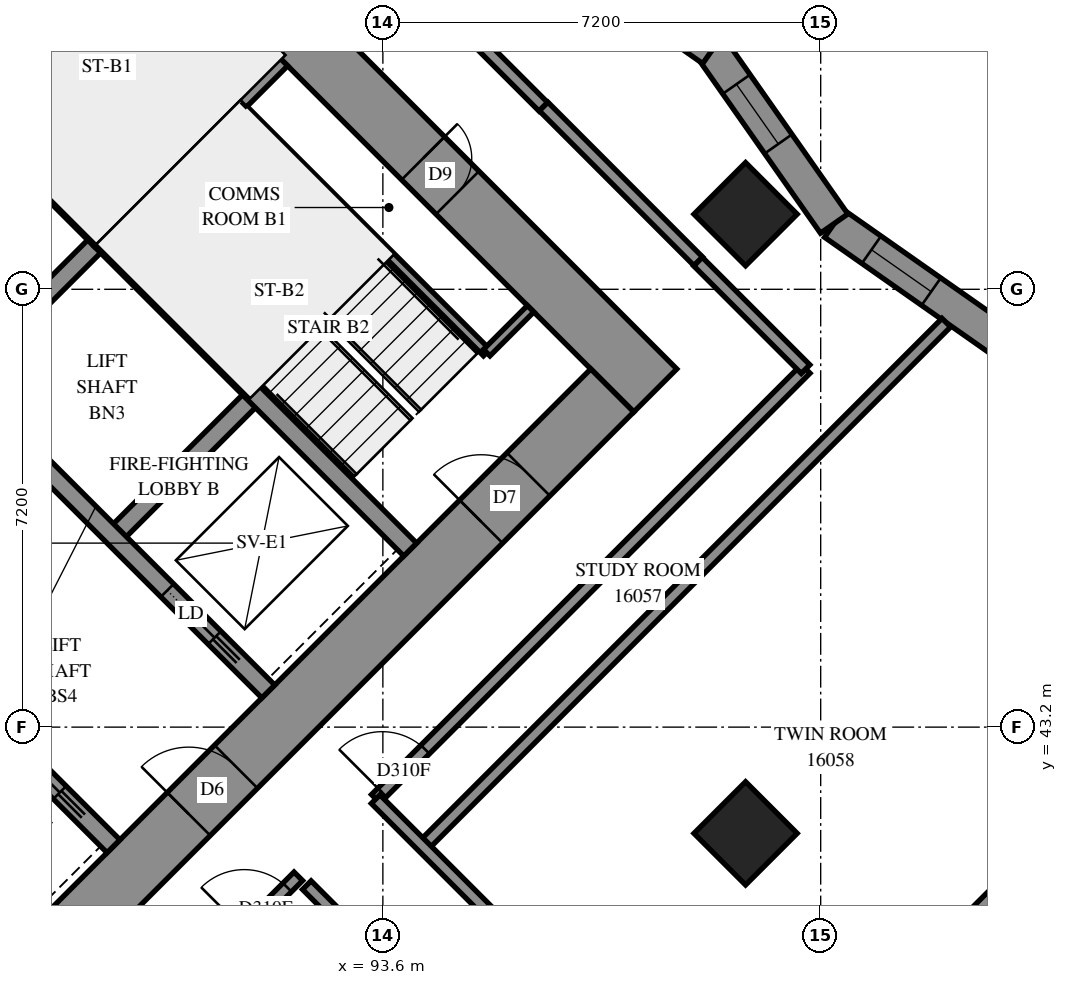
"""IFC4 building model, lengths in metres.
Left out: names, types, materials, properties, quantities, classifications, styles, units other than length and angle.
Written with IfcOpenShell. Run it as: python <this file> out.ifc"""

import sys

from ifc_helpers import new_model, si_unit, direction, frame, frame_2d, origin, origin_2d, place, context, subcontext, project, spatial, polyline, rectangle, outline, extrude, element, fill, save


model = new_model("IFC4")
c1 = context("Model", 3, precision=1e-05, world=origin(), true_north=direction((0.0, 1.0)))
c2 = subcontext(c1, "Body", "Model", "MODEL_VIEW")
j1 = project(units=[si_unit("LENGTHUNIT", "METRE"), si_unit("PLANEANGLEUNIT", "RADIAN")], contexts=[c1])
p1 = place(None, origin())
s1 = spatial("IfcSite", under=j1, at=p1, CompositionType="ELEMENT")
p2 = place(p1, origin())
s2 = spatial("IfcBuilding", under=s1, at=p2, CompositionType="ELEMENT")
p3 = place(p2, frame((0.0, 0.0, 61.0)))
s3 = spatial("IfcBuildingStorey", under=s2, at=p3, CompositionType="ELEMENT", Elevation=61.0)
for number, where, z_axis, x_axis in (
    (1, (99.565, 51.635, 0.0), (0.0, 0.0, 1.0), (0.707, -0.707, 0.0)),
    (2, (99.565, 41.453, 0.0), (0.0, 0.0, 1.0), (0.707, -0.707, 0.0)),
):
    element("IfcColumn", number, at=place(p3, frame(where, z_axis=z_axis, x_axis=x_axis)), inside=s3, PredefinedType="COLUMN", context=c2, shape_type="SweptSolid", body=[
        extrude(rectangle(XDim=1.2, YDim=1.2, at=origin_2d()), origin(), (0.0, 0.0, 1.0), 3.1),
    ])
p4 = place(p3, frame((86.483, 60.333, -0.3), z_axis=(0.0, 0.0, 1.0), x_axis=(0.70710983, -0.7071037324, 0.0)))
e3 = element("IfcWall", 3, at=p4, inside=s3, PredefinedType="SHEAR", context=c2, shape_type="SweptSolid", body=[
    extrude(rectangle(XDim=16.4, YDim=1.0, at=frame_2d((8.2, 0.0))), origin(), (0.0, 0.0, 1.0), 2.7),
])
p5 = place(p4, frame((11.0, 0.0, 0.3)))
e4 = element("IfcOpeningElement", 4, at=p5, cuts=e3, PredefinedType="OPENING", context=c2, shape_type="SweptSolid", body=[
    extrude(rectangle(XDim=0.8, YDim=2.1, at=frame_2d((0.4, 1.05))), frame((0.0, 0.51, 0.0), z_axis=(0.0, -1.0, 0.0), x_axis=(1.0, 0.0, 0.0)), (0.0, 0.0, 1.0), 1.02),
])
p6 = place(p3, frame((87.19, 38.554, -0.3), z_axis=(0.0, 0.0, 1.0), x_axis=(0.707103309, 0.7071102534, 0.0)))
e5 = element("IfcWall", 5, at=p6, inside=s3, PredefinedType="SHEAR", context=c2, shape_type="SweptSolid", body=[
    extrude(rectangle(XDim=14.4, YDim=1.0, at=frame_2d((7.2, 0.0))), origin(), (0.0, 0.0, 1.0), 2.7),
])
p7 = place(p6, frame((4.55, 0.0, 0.3)))
e6 = element("IfcOpeningElement", 6, at=p7, cuts=e5, PredefinedType="OPENING", context=c2, shape_type="SweptSolid", body=[
    extrude(rectangle(XDim=1.1, YDim=2.1, at=frame_2d((0.55, 1.05))), frame((0.0, 0.51, 0.0), z_axis=(0.0, -1.0, 0.0), x_axis=(1.0, 0.0, 0.0)), (0.0, 0.0, 1.0), 1.02),
])
p8 = place(p6, frame((11.35, 0.0, 0.3)))
e7 = element("IfcOpeningElement", 7, at=p8, cuts=e5, PredefinedType="OPENING", context=c2, shape_type="SweptSolid", body=[
    extrude(rectangle(XDim=1.1, YDim=2.1, at=frame_2d((0.55, 1.05))), frame((0.0, 0.51, 0.0), z_axis=(0.0, -1.0, 0.0), x_axis=(1.0, 0.0, 0.0)), (0.0, 0.0, 1.0), 1.02),
])
for number, where, z_axis, x_axis in (
    (8, (86.625, 48.878, 0.0), (0.0, 0.0, 1.0), (0.707, 0.707, 0.0)),
    (9, (89.17, 46.332, 0.0), (0.0, 0.0, 1.0), (0.707, 0.707, 0.0)),
):
    element("IfcWall", number, at=place(p3, frame(where, z_axis=z_axis, x_axis=x_axis)), inside=s3, PredefinedType="SOLIDWALL", context=c2, shape_type="SweptSolid", body=[
        extrude(rectangle(XDim=3.3, YDim=0.3, at=frame_2d((1.65, 0.0))), origin(), (0.0, 0.0, 1.0), 3.1),
    ])
p9 = place(p3, frame((78.988, 51.423, 0.0), z_axis=(0.0, 0.0, 1.0), x_axis=(0.7071067812, -0.7071067812, 0.0)))
e10 = element("IfcWall", 10, at=p9, inside=s3, PredefinedType="SOLIDWALL", context=c2, shape_type="SweptSolid", body=[
    extrude(rectangle(XDim=14.4, YDim=0.3, at=frame_2d((7.2, 0.0))), origin(), (0.0, 0.0, 1.0), 3.1),
])
p10 = place(p9, frame((1.25, 0.0, 0.0)))
e11 = element("IfcOpeningElement", 11, at=p10, cuts=e10, PredefinedType="OPENING", context=c2, shape_type="SweptSolid", body=[
    extrude(rectangle(XDim=1.1, YDim=2.1, at=frame_2d((0.55, 1.05))), frame((0.0, 0.16, 0.0), z_axis=(0.0, -1.0, 0.0), x_axis=(1.0, 0.0, 0.0)), (0.0, 0.0, 1.0), 0.32),
])
p11 = place(p9, frame((4.85, 0.0, 0.0)))
e12 = element("IfcOpeningElement", 12, at=p11, cuts=e10, PredefinedType="OPENING", context=c2, shape_type="SweptSolid", body=[
    extrude(rectangle(XDim=1.1, YDim=2.1, at=frame_2d((0.55, 1.05))), frame((0.0, 0.16, 0.0), z_axis=(0.0, -1.0, 0.0), x_axis=(1.0, 0.0, 0.0)), (0.0, 0.0, 1.0), 0.32),
])
p12 = place(p9, frame((8.45, 0.0, 0.0)))
e13 = element("IfcOpeningElement", 13, at=p12, cuts=e10, PredefinedType="OPENING", context=c2, shape_type="SweptSolid", body=[
    extrude(rectangle(XDim=1.1, YDim=2.1, at=frame_2d((0.55, 1.05))), frame((0.0, 0.16, 0.0), z_axis=(0.0, -1.0, 0.0), x_axis=(1.0, 0.0, 0.0)), (0.0, 0.0, 1.0), 0.32),
])
p13 = place(p9, frame((12.05, 0.0, 0.0)))
e14 = element("IfcOpeningElement", 14, at=p13, cuts=e10, PredefinedType="OPENING", context=c2, shape_type="SweptSolid", body=[
    extrude(rectangle(XDim=1.1, YDim=2.1, at=frame_2d((0.55, 1.05))), frame((0.0, 0.16, 0.0), z_axis=(0.0, -1.0, 0.0), x_axis=(1.0, 0.0, 0.0)), (0.0, 0.0, 1.0), 0.32),
])
p14 = place(p3, frame((81.534, 53.969, 0.0), z_axis=(0.0, 0.0, 1.0), x_axis=(0.707103309, -0.7071102534, 0.0)))
e15 = element("IfcWall", 15, at=p14, inside=s3, PredefinedType="SOLIDWALL", context=c2, shape_type="SweptSolid", body=[
    extrude(rectangle(XDim=14.4, YDim=0.3, at=frame_2d((7.2, 0.0))), origin(), (0.0, 0.0, 1.0), 3.1),
])
p15 = place(p14, frame((12.05, 0.0, 0.0)))
e16 = element("IfcOpeningElement", 16, at=p15, cuts=e15, PredefinedType="OPENING", context=c2, shape_type="SweptSolid", body=[
    extrude(rectangle(XDim=1.1, YDim=2.1, at=frame_2d((0.55, 1.05))), frame((0.0, 0.16, 0.0), z_axis=(0.0, -1.0, 0.0), x_axis=(1.0, 0.0, 0.0)), (0.0, 0.0, 1.0), 0.32),
])
for number, where, z_axis, x_axis in (
    (17, (83.867, 56.302, 0.0), (0.0, 0.0, 1.0), (0.707, -0.707, 0.0)),
    (18, (88.958, 51.211, 0.0), (0.0, 0.0, 1.0), (0.707, -0.707, 0.0)),
):
    element("IfcWall", number, at=place(p3, frame(where, z_axis=z_axis, x_axis=x_axis)), inside=s3, PredefinedType="SOLIDWALL", context=c2, shape_type="SweptSolid", body=[
        extrude(rectangle(XDim=7.2, YDim=0.3, at=frame_2d((3.6, 0.0))), origin(), (0.0, 0.0, 1.0), 3.1),
    ])
p16 = place(p3, frame((88.958, 51.211, 0.0), z_axis=(0.0, 0.0, 1.0), x_axis=(0.7071067812, 0.7071067812, 0.0)))
e19 = element("IfcWall", 19, at=p16, inside=s3, PredefinedType="SOLIDWALL", context=c2, shape_type="SweptSolid", body=[
    extrude(rectangle(XDim=4.2, YDim=0.3, at=frame_2d((2.1, 0.0))), origin(), (0.0, 0.0, 1.0), 3.1),
])
p17 = place(p3, frame((103.878, 49.477, 0.0), z_axis=(0.0, 0.0, 1.0), x_axis=(-0.8186472188, 0.5742967275, 0.0)))
e20 = element("IfcWall", 20, at=p17, inside=s3, PredefinedType="SOLIDWALL", context=c2, shape_type="SweptSolid", body=[
    extrude(outline(polyline([(-0.048, -0.275), (3.442, -0.275), (3.538, 0.275), (0.048, 0.275), (-0.048, -0.275)])), origin(), (0.0, 0.0, 1.0), 3.1),
])
p18 = place(p17, frame((1.541, 0.0, 0.5)))
e21 = element("IfcOpeningElement", 21, at=p18, cuts=e20, PredefinedType="OPENING", context=c2, shape_type="SweptSolid", body=[
    extrude(rectangle(XDim=1.2, YDim=2.45, at=frame_2d((0.6, 1.225))), frame((0.0, 0.285, 0.0), z_axis=(0.0, -1.0, 0.0), x_axis=(1.0, 0.0, 0.0)), (0.0, 0.0, 1.0), 0.57),
])
p19 = place(p3, frame((101.022, 51.481, 0.0), z_axis=(0.0, 0.0, 1.0), x_axis=(-0.5742967275, 0.8186472188, 0.0)))
e22 = element("IfcWall", 22, at=p19, inside=s3, PredefinedType="SOLIDWALL", context=c2, shape_type="SweptSolid", body=[
    extrude(outline(polyline([(0.048, -0.275), (3.538, -0.275), (3.442, 0.275), (-0.048, 0.275), (0.048, -0.275)])), origin(), (0.0, 0.0, 1.0), 3.1),
])
p20 = place(p19, frame((1.599, 0.0, 0.5)))
e23 = element("IfcOpeningElement", 23, at=p20, cuts=e22, PredefinedType="OPENING", context=c2, shape_type="SweptSolid", body=[
    extrude(rectangle(XDim=1.2, YDim=2.45, at=frame_2d((0.6, 1.225))), frame((0.0, 0.285, 0.0), z_axis=(0.0, -1.0, 0.0), x_axis=(1.0, 0.0, 0.0)), (0.0, 0.0, 1.0), 0.57),
])
p21 = place(p3, frame((99.017, 54.337, 0.0), z_axis=(0.0, 0.0, 1.0), x_axis=(-0.8186566697, 0.5742832552, 0.0)))
e24 = element("IfcWall", 24, at=p21, inside=s3, PredefinedType="SOLIDWALL", context=c2, shape_type="SweptSolid", body=[
    extrude(outline(polyline([(-0.048, -0.275), (3.442, -0.275), (3.538, 0.275), (0.048, 0.275), (-0.048, -0.275)])), origin(), (0.0, 0.0, 1.0), 3.1),
])
p22 = place(p21, frame((1.706, 0.0, 0.5)))
e25 = element("IfcOpeningElement", 25, at=p22, cuts=e24, PredefinedType="OPENING", context=c2, shape_type="SweptSolid", body=[
    extrude(rectangle(XDim=1.2, YDim=2.45, at=frame_2d((0.6, 1.225))), frame((0.0, 0.285, 0.0), z_axis=(0.0, -1.0, 0.0), x_axis=(1.0, 0.0, 0.0)), (0.0, 0.0, 1.0), 0.57),
])
p23 = place(p3, frame((91.313, 53.354, 0.0), z_axis=(0.0, 0.0, 1.0), x_axis=(0.7071067812, -0.7071067812, 0.0)))
e26 = element("IfcWall", 26, at=p23, inside=s3, PredefinedType="PARTITIONING", context=c2, shape_type="SweptSolid", body=[
    extrude(rectangle(XDim=5.65, YDim=0.15, at=frame_2d((2.825, 0.0))), origin(), (0.0, 0.0, 1.0), 3.1),
])
p24 = place(p3, frame((95.308, 49.358, 0.0), z_axis=(0.0, 0.0, 1.0), x_axis=(0.70705776, 0.707155799, 0.0)))
e27 = element("IfcWall", 27, at=p24, inside=s3, PredefinedType="PARTITIONING", context=c2, shape_type="SweptSolid", body=[
    extrude(rectangle(XDim=1.02, YDim=0.15, at=frame_2d((0.51, 0.0))), origin(), (0.0, 0.0, 1.0), 3.1),
])
p25 = place(p3, frame((86.833, 62.805, 0.0), z_axis=(0.0, 0.0, 1.0), x_axis=(0.7072045138, -0.7070090351, 0.0)))
e28 = element("IfcWall", 28, at=p25, inside=s3, PredefinedType="PARTITIONING", context=c2, shape_type="SweptSolid", body=[
    extrude(rectangle(XDim=13.301, YDim=0.2, at=frame_2d((6.65, 0.0))), origin(), (0.0, 0.0, 1.0), 3.1),
])
p26 = place(p25, frame((10.586, 0.0, 0.0)))
e29 = element("IfcOpeningElement", 29, at=p26, cuts=e28, PredefinedType="OPENING", context=c2, shape_type="SweptSolid", body=[
    extrude(rectangle(XDim=1.0, YDim=2.1, at=frame_2d((0.5, 1.05))), frame((0.0, 0.11, 0.0), z_axis=(0.0, -1.0, 0.0), x_axis=(1.0, 0.0, 0.0)), (0.0, 0.0, 1.0), 0.22),
])
p27 = place(p3, frame((94.259, 41.243, 0.0), z_axis=(0.0, 0.0, 1.0), x_axis=(0.7070205168, 0.707193035, 0.0)))
e30 = element("IfcWall", 30, at=p27, inside=s3, PredefinedType="PARTITIONING", context=c2, shape_type="SweptSolid", body=[
    extrude(rectangle(XDim=12.173, YDim=0.2, at=frame_2d((6.086, 0.0))), origin(), (0.0, 0.0, 1.0), 3.1),
])
p28 = place(p3, frame((93.484, 42.02, 0.0), z_axis=(0.0, 0.0, 1.0), x_axis=(0.7071067812, 0.7071067812, 0.0)))
e31 = element("IfcWall", 31, at=p28, inside=s3, PredefinedType="PARTITIONING", context=c2, shape_type="SweptSolid", body=[
    extrude(rectangle(XDim=9.998, YDim=0.2, at=frame_2d((4.999, 0.0))), origin(), (0.0, 0.0, 1.0), 3.1),
])
p29 = place(p28, frame((0.148, 0.0, 0.0)))
e32 = element("IfcOpeningElement", 32, at=p29, cuts=e31, PredefinedType="OPENING", context=c2, shape_type="SweptSolid", body=[
    extrude(rectangle(XDim=1.0, YDim=2.1, at=frame_2d((0.5, 1.05))), frame((0.0, 0.11, 0.0), z_axis=(0.0, -1.0, 0.0), x_axis=(1.0, 0.0, 0.0)), (0.0, 0.0, 1.0), 0.22),
])
p30 = place(p3, frame((101.049, 37.847, 0.0), z_axis=(0.0, 0.0, 1.0), x_axis=(0.7071067812, 0.7071067812, 0.0)))
e33 = element("IfcWall", 33, at=p30, inside=s3, PredefinedType="PARTITIONING", context=c2, shape_type="SweptSolid", body=[
    extrude(rectangle(XDim=9.831, YDim=0.2, at=frame_2d((4.915, 0.0))), origin(), (0.0, 0.0, 1.0), 3.1),
])
p31 = place(p3, frame((92.349, 40.601, 0.0), z_axis=(0.0, 0.0, 1.0), x_axis=(0.7071067812, -0.7071067812, 0.0)))
e34 = element("IfcWall", 34, at=p31, inside=s3, PredefinedType="PARTITIONING", context=c2, shape_type="SweptSolid", body=[
    extrude(rectangle(XDim=8.101, YDim=0.2, at=frame_2d((4.05, 0.0))), origin(), (0.0, 0.0, 1.0), 3.1),
])
p32 = place(p31, frame((2.909, 0.0, 0.0)))
e35 = element("IfcOpeningElement", 35, at=p32, cuts=e34, PredefinedType="OPENING", context=c2, shape_type="SweptSolid", body=[
    extrude(rectangle(XDim=0.9, YDim=2.1, at=frame_2d((0.45, 1.05))), frame((0.0, 0.11, 0.0), z_axis=(0.0, -1.0, 0.0), x_axis=(1.0, 0.0, 0.0)), (0.0, 0.0, 1.0), 0.22),
])
p33 = place(p3, frame((86.836, 35.372, 0.0), z_axis=(0.0, 0.0, 1.0), x_axis=(0.7071067812, 0.7071067812, 0.0)))
e36 = element("IfcWall", 36, at=p33, inside=s3, PredefinedType="PARTITIONING", context=c2, shape_type="SweptSolid", body=[
    extrude(rectangle(XDim=7.6, YDim=0.2, at=frame_2d((3.8, 0.0))), origin(), (0.0, 0.0, 1.0), 3.1),
])
p34 = place(p33, frame((6.342, 0.0, 0.0)))
e37 = element("IfcOpeningElement", 37, at=p34, cuts=e36, PredefinedType="OPENING", context=c2, shape_type="SweptSolid", body=[
    extrude(rectangle(XDim=1.0, YDim=2.1, at=frame_2d((0.5, 1.05))), frame((0.0, 0.11, 0.0), z_axis=(0.0, -1.0, 0.0), x_axis=(1.0, 0.0, 0.0)), (0.0, 0.0, 1.0), 0.22),
])
p35 = place(p3, frame((93.481, 42.015, 0.0), z_axis=(0.0, 0.0, 1.0), x_axis=(0.7071067812, -0.7071067812, 0.0)))
e38 = element("IfcWall", 38, at=p35, inside=s3, PredefinedType="PARTITIONING", context=c2, shape_type="SweptSolid", body=[
    extrude(rectangle(XDim=4.698, YDim=0.2, at=frame_2d((2.349, 0.0))), origin(), (0.0, 0.0, 1.0), 3.1),
])
p36 = place(p35, frame((3.452, 0.0, 0.0)))
e39 = element("IfcOpeningElement", 39, at=p36, cuts=e38, PredefinedType="OPENING", context=c2, shape_type="SweptSolid", body=[
    extrude(rectangle(XDim=0.9, YDim=2.1, at=frame_2d((0.45, 1.05))), frame((0.0, 0.11, 0.0), z_axis=(0.0, -1.0, 0.0), x_axis=(1.0, 0.0, 0.0)), (0.0, 0.0, 1.0), 0.22),
])
p37 = place(p3, frame((96.244, 53.406, 0.0), z_axis=(0.0, 0.0, 1.0), x_axis=(0.7068288851, -0.7073845681, 0.0)))
e40 = element("IfcWall", 40, at=p37, inside=s3, PredefinedType="PARTITIONING", context=c2, shape_type="SweptSolid", body=[
    extrude(rectangle(XDim=3.599, YDim=0.2, at=frame_2d((1.8, 0.0))), origin(), (0.0, 0.0, 1.0), 3.1),
])
p38 = place(p3, frame((98.783, 50.855, 0.0), z_axis=(0.0, 0.0, 1.0), x_axis=(0.7071067812, -0.7071067812, 0.0)))
e41 = element("IfcWall", 41, at=p38, inside=s3, PredefinedType="PARTITIONING", context=c2, shape_type="SweptSolid", body=[
    extrude(rectangle(XDim=2.5, YDim=0.2, at=frame_2d((1.25, 0.0))), origin(), (0.0, 0.0, 1.0), 3.1),
])
p39 = place(p18, origin())
e42 = element("IfcWindow", 42, at=p39, inside=s3, PartitioningType="SINGLE_PANEL", PredefinedType="WINDOW", context=c2, shape_type="SweptSolid", body=[
    extrude(rectangle(XDim=1.2, YDim=2.45, at=frame_2d((0.6, 1.225))), frame((0.0, 0.155, 0.0), z_axis=(0.0, -1.0, 0.0), x_axis=(1.0, 0.0, 0.0)), (0.0, 0.0, 1.0), 0.06),
])
fill(e21, e42)
p40 = place(p20, origin())
e43 = element("IfcWindow", 43, at=p40, inside=s3, PartitioningType="SINGLE_PANEL", PredefinedType="WINDOW", context=c2, shape_type="SweptSolid", body=[
    extrude(rectangle(XDim=1.2, YDim=2.45, at=frame_2d((0.6, 1.225))), frame((0.0, 0.155, 0.0), z_axis=(0.0, -1.0, 0.0), x_axis=(1.0, 0.0, 0.0)), (0.0, 0.0, 1.0), 0.06),
])
fill(e23, e43)
p41 = place(p5, origin())
e44 = element("IfcDoor", 44, at=p41, inside=s3, OperationType="SINGLE_SWING_RIGHT", PredefinedType="DOOR", context=c2, shape_type="SweptSolid", body=[
    extrude(rectangle(XDim=0.8, YDim=2.1, at=frame_2d((0.4, 1.05))), frame((0.0, -0.44, 0.0), z_axis=(0.0, -1.0, 0.0), x_axis=(1.0, 0.0, 0.0)), (0.0, 0.0, 1.0), 0.05),
])
fill(e4, e44)
p42 = place(p7, origin())
e45 = element("IfcDoor", 45, at=p42, inside=s3, OperationType="DOUBLE_DOOR_SINGLE_SWING", PredefinedType="DOOR", context=c2, shape_type="SweptSolid", body=[
    extrude(rectangle(XDim=1.1, YDim=2.1, at=frame_2d((0.55, 1.05))), frame((0.0, 0.025, 0.0), z_axis=(0.0, -1.0, 0.0), x_axis=(1.0, 0.0, 0.0)), (0.0, 0.0, 1.0), 0.05),
])
fill(e6, e45)
p43 = place(p8, origin())
e46 = element("IfcDoor", 46, at=p43, inside=s3, OperationType="SINGLE_SWING_RIGHT", PredefinedType="DOOR", context=c2, shape_type="SweptSolid", body=[
    extrude(rectangle(XDim=1.1, YDim=2.1, at=frame_2d((0.55, 1.05))), frame((0.0, 0.025, 0.0), z_axis=(0.0, -1.0, 0.0), x_axis=(1.0, 0.0, 0.0)), (0.0, 0.0, 1.0), 0.05),
])
fill(e7, e46)
p44 = place(p13, origin())
e47 = element("IfcDoor", 47, at=p44, inside=s3, OperationType="SLIDING_TO_RIGHT", PredefinedType="DOOR", context=c2, shape_type="SweptSolid", body=[
    extrude(rectangle(XDim=1.1, YDim=2.1, at=frame_2d((0.55, 1.05))), frame((0.0, 0.025, 0.0), z_axis=(0.0, -1.0, 0.0), x_axis=(1.0, 0.0, 0.0)), (0.0, 0.0, 1.0), 0.05),
])
fill(e14, e47)
p45 = place(p15, origin())
e48 = element("IfcDoor", 48, at=p45, inside=s3, OperationType="SLIDING_TO_RIGHT", PredefinedType="DOOR", context=c2, shape_type="SweptSolid", body=[
    extrude(rectangle(XDim=1.1, YDim=2.1, at=frame_2d((0.55, 1.05))), frame((0.0, 0.025, 0.0), z_axis=(0.0, -1.0, 0.0), x_axis=(1.0, 0.0, 0.0)), (0.0, 0.0, 1.0), 0.05),
])
fill(e16, e48)
p46 = place(p29, origin())
e49 = element("IfcDoor", 49, at=p46, inside=s3, OperationType="SINGLE_SWING_LEFT", PredefinedType="DOOR", context=c2, shape_type="SweptSolid", body=[
    extrude(rectangle(XDim=1.0, YDim=2.1, at=frame_2d((0.5, 1.05))), frame((0.0, 0.025, 0.0), z_axis=(0.0, -1.0, 0.0), x_axis=(1.0, 0.0, 0.0)), (0.0, 0.0, 1.0), 0.05),
])
fill(e32, e49)
p47 = place(p34, origin())
e50 = element("IfcDoor", 50, at=p47, inside=s3, OperationType="SINGLE_SWING_RIGHT", PredefinedType="DOOR", context=c2, shape_type="SweptSolid", body=[
    extrude(rectangle(XDim=1.0, YDim=2.1, at=frame_2d((0.5, 1.05))), frame((0.0, 0.025, 0.0), z_axis=(0.0, -1.0, 0.0), x_axis=(1.0, 0.0, 0.0)), (0.0, 0.0, 1.0), 0.05),
])
fill(e37, e50)
save(model, sys.argv[1])
